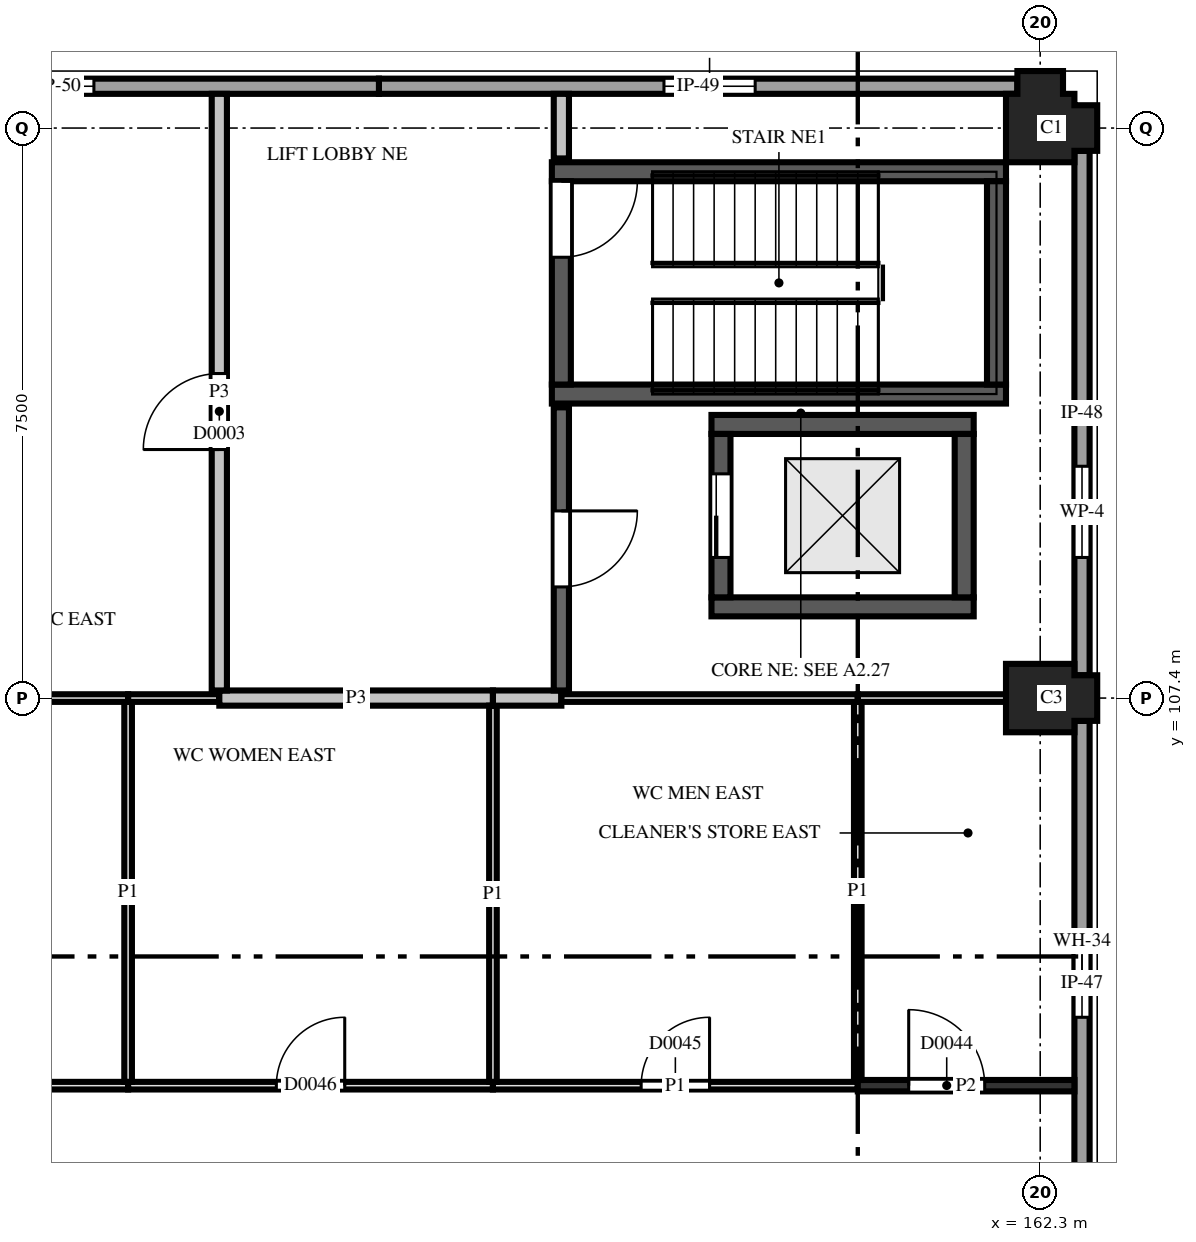
"""IFC4 building model, lengths in metres.
Left out: names, types, materials, properties, quantities, classifications, styles, units other than length and angle.
Written with IfcOpenShell. Run it as: python <this file> out.ifc"""

import sys

from ifc_helpers import new_model, si_unit, direction, frame, frame_2d, origin, place, context, subcontext, project, spatial, polyline, rectangle, outline, extrude, element, fill, save


model = new_model("IFC4")
c1 = context("Model", 3, precision=1e-05, world=origin(), true_north=direction((0.0, 1.0)))
c2 = subcontext(c1, "Body", "Model", "MODEL_VIEW")
j1 = project(units=[si_unit("LENGTHUNIT", "METRE"), si_unit("PLANEANGLEUNIT", "RADIAN")], contexts=[c1])
p1 = place(None, origin())
s1 = spatial("IfcSite", under=j1, at=p1, CompositionType="ELEMENT")
p2 = place(p1, origin())
s2 = spatial("IfcBuilding", under=s1, at=p2, CompositionType="ELEMENT")
p3 = place(p2, origin())
s3 = spatial("IfcBuildingStorey", under=s2, at=p3, CompositionType="ELEMENT", Elevation=0.0)
p4 = place(p3, frame((162.3, 107.4, 0.0), z_axis=(0.0, 0.0, 1.0), x_axis=(1.0, 0.0, 0.0)))
e1 = element("IfcColumn", 1, at=p4, inside=s3, PredefinedType="COLUMN", context=c2, shape_type="SweptSolid", body=[
    extrude(outline(polyline([(-0.45, -0.45), (0.45, -0.45), (0.45, -0.3), (0.75, -0.3), (0.75, 0.3), (0.45, 0.3), (0.45, 0.45), (-0.45, 0.45), (-0.45, -0.45)])), origin(), (0.0, 0.0, 1.0), 4.5),
])
p5 = place(p3, frame((162.3, 114.9, 0.0), z_axis=(0.0, 0.0, 1.0), x_axis=(1.0, 0.0, 0.0)))
e2 = element("IfcColumn", 2, at=p5, inside=s3, PredefinedType="COLUMN", context=c2, shape_type="SweptSolid", body=[
    extrude(outline(polyline([(-0.45, -0.45), (0.45, -0.45), (0.45, -0.3), (0.75, -0.3), (0.75, 0.3), (0.45, 0.3), (0.45, 0.45), (0.3, 0.45), (0.3, 0.75), (-0.3, 0.75), (-0.3, 0.45), (-0.45, 0.45), (-0.45, -0.45)])), origin(), (0.0, 0.0, 1.0), 4.5),
])
for number, where, z_axis, x_axis in (
    (3, (157.975, 108.6, -1.4), (0.0, 0.0, 1.0), (1.0, 0.0, 0.0)),
    (4, (157.975, 111.0, -1.4), (0.0, 0.0, 1.0), (1.0, 0.0, 0.0)),
):
    element("IfcWall", number, at=place(p3, frame(where, z_axis=z_axis, x_axis=x_axis)), inside=s3, PredefinedType="SHEAR", context=c2, shape_type="SweptSolid", body=[
        extrude(rectangle(XDim=3.45, YDim=0.25, at=frame_2d((1.725, 0.0))), origin(), (0.0, 0.0, 1.0), 5.9),
    ])
for number, where, z_axis, x_axis in (
    (5, (155.875, 111.4, 0.0), (0.0, 0.0, 1.0), (1.0, 0.0, 0.0)),
    (6, (155.875, 114.325, 0.0), (0.0, 0.0, 1.0), (1.0, 0.0, 0.0)),
):
    element("IfcWall", number, at=place(p3, frame(where, z_axis=z_axis, x_axis=x_axis)), inside=s3, PredefinedType="SHEAR", context=c2, shape_type="SweptSolid", body=[
        extrude(rectangle(XDim=5.975, YDim=0.25, at=frame_2d((2.988, 0.0))), origin(), (0.0, 0.0, 1.0), 4.5),
    ])
p6 = place(p3, frame((156.0, 111.525, 0.0), z_axis=(0.0, 0.0, 1.0), x_axis=(0.0, 1.0, 0.0)))
e7 = element("IfcWall", 7, at=p6, inside=s3, PredefinedType="SHEAR", context=c2, shape_type="SweptSolid", body=[
    extrude(rectangle(XDim=2.675, YDim=0.25, at=frame_2d((1.337, 0.0))), origin(), (0.0, 0.0, 1.0), 4.5),
])
p7 = place(p6, frame((1.675, 0.0, 0.0)))
e8 = element("IfcOpeningElement", 8, at=p7, cuts=e7, PredefinedType="OPENING", context=c2, shape_type="SweptSolid", body=[
    extrude(rectangle(XDim=1.0, YDim=2.1, at=frame_2d((0.5, 1.05))), frame((0.0, 0.135, 0.0), z_axis=(0.0, -1.0, 0.0), x_axis=(1.0, 0.0, 0.0)), (0.0, 0.0, 1.0), 0.27),
])
p8 = place(p3, frame((158.1, 108.725, -1.4), z_axis=(0.0, 0.0, 1.0), x_axis=(0.0, 1.0, 0.0)))
e9 = element("IfcWall", 9, at=p8, inside=s3, PredefinedType="SHEAR", context=c2, shape_type="SweptSolid", body=[
    extrude(rectangle(XDim=2.15, YDim=0.25, at=frame_2d((1.075, 0.0))), origin(), (0.0, 0.0, 1.0), 5.9),
])
p9 = place(p8, frame((0.525, 0.0, 1.4)))
e10 = element("IfcOpeningElement", 10, at=p9, cuts=e9, PredefinedType="OPENING", context=c2, shape_type="SweptSolid", body=[
    extrude(rectangle(XDim=1.1, YDim=2.1, at=frame_2d((0.55, 1.05))), frame((0.0, 0.135, 0.0), z_axis=(0.0, -1.0, 0.0), x_axis=(1.0, 0.0, 0.0)), (0.0, 0.0, 1.0), 0.27),
])
p10 = place(p3, frame((161.3, 108.725, -1.4), z_axis=(0.0, 0.0, 1.0), x_axis=(0.0, 1.0, 0.0)))
e11 = element("IfcWall", 11, at=p10, inside=s3, PredefinedType="SHEAR", context=c2, shape_type="SweptSolid", body=[
    extrude(rectangle(XDim=2.15, YDim=0.25, at=frame_2d((1.075, 0.0))), origin(), (0.0, 0.0, 1.0), 5.9),
])
p11 = place(p3, frame((161.725, 111.525, 0.0), z_axis=(0.0, 0.0, 1.0), x_axis=(0.0, 1.0, 0.0)))
e12 = element("IfcWall", 12, at=p11, inside=s3, PredefinedType="SHEAR", context=c2, shape_type="SweptSolid", body=[
    extrude(rectangle(XDim=2.675, YDim=0.25, at=frame_2d((1.337, 0.0))), origin(), (0.0, 0.0, 1.0), 4.5),
])
p12 = place(p3, frame((162.85, 100.2, 0.0), z_axis=(0.0, 0.0, 1.0), x_axis=(0.0, 1.0, 0.0)))
e13 = element("IfcWall", 13, at=p12, inside=s3, PredefinedType="SOLIDWALL", context=c2, shape_type="SweptSolid", body=[
    extrude(outline(polyline([(0.0, 0.0), (6.9, 0.0), (6.9, 3.1), (6.002, 3.1), (6.0, 2.4), (5.681, 2.56), (5.363, 2.695), (5.044, 2.806), (4.725, 2.895), (4.406, 2.963), (4.087, 3.012), (3.769, 3.041), (3.45, 3.05), (3.131, 3.041), (2.812, 3.012), (2.494, 2.963), (2.175, 2.895), (1.856, 2.806), (1.538, 2.695), (1.219, 2.56), (0.9, 2.4), (0.898, 3.1), (0.0, 3.1), (0.0, 0.0)])), frame((0.0, 0.1, 0.0), z_axis=(0.0, -1.0, 0.0), x_axis=(1.0, 0.0, 0.0)), (0.0, 0.0, 1.0), 0.2),
])
p13 = place(p12, frame((3.0, 0.0, 2.4)))
e14 = element("IfcOpeningElement", 14, at=p13, cuts=e13, PredefinedType="OPENING", context=c2, shape_type="SweptSolid", body=[
    extrude(rectangle(XDim=0.9, YDim=0.531, at=frame_2d((0.45, 0.266))), frame((0.0, 0.11, 0.0), z_axis=(0.0, -1.0, 0.0), x_axis=(1.0, 0.0, 0.0)), (0.0, 0.0, 1.0), 0.22),
])
p14 = place(p3, frame((162.85, 107.7, 0.0), z_axis=(0.0, 0.0, 1.0), x_axis=(0.0, 1.0, 0.0)))
e15 = element("IfcWall", 15, at=p14, inside=s3, PredefinedType="SOLIDWALL", context=c2, shape_type="SweptSolid", body=[
    extrude(outline(polyline([(0.0, 0.0), (6.9, 0.0), (6.9, 3.1), (6.002, 3.1), (6.0, 2.4), (5.681, 2.56), (5.363, 2.695), (5.044, 2.806), (4.725, 2.895), (4.406, 2.963), (4.087, 3.012), (3.769, 3.041), (3.45, 3.05), (3.131, 3.041), (2.812, 3.012), (2.494, 2.963), (2.175, 2.895), (1.856, 2.806), (1.538, 2.695), (1.219, 2.56), (0.9, 2.4), (0.898, 3.1), (0.0, 3.1), (0.0, 0.0)])), frame((0.0, 0.1, 0.0), z_axis=(0.0, -1.0, 0.0), x_axis=(1.0, 0.0, 0.0)), (0.0, 0.0, 1.0), 0.2),
])
p15 = place(p14, frame((1.55, 0.0, 0.6)))
e16 = element("IfcOpeningElement", 16, at=p15, cuts=e15, PredefinedType="OPENING", context=c2, shape_type="SweptSolid", body=[
    extrude(rectangle(XDim=1.2, YDim=1.2, at=frame_2d((0.6, 0.6))), frame((0.0, 0.11, 0.0), z_axis=(0.0, -1.0, 0.0), x_axis=(1.0, 0.0, 0.0)), (0.0, 0.0, 1.0), 0.22),
])
p16 = place(p3, frame((162.0, 115.45, 0.0), z_axis=(0.0, 0.0, 1.0), x_axis=(-1.0, 0.0, 0.0)))
e17 = element("IfcWall", 17, at=p16, inside=s3, PredefinedType="SOLIDWALL", context=c2, shape_type="SweptSolid", body=[
    extrude(outline(polyline([(0.0, 0.0), (8.4, 0.0), (8.4, 2.5), (7.202, 2.5), (7.2, 2.4), (6.806, 2.412), (6.413, 2.422), (6.019, 2.43), (5.625, 2.438), (5.231, 2.443), (4.837, 2.447), (4.444, 2.449), (4.05, 2.45), (3.656, 2.449), (3.262, 2.447), (2.869, 2.443), (2.475, 2.438), (2.081, 2.43), (1.688, 2.422), (1.294, 2.412), (0.9, 2.4), (0.898, 2.5), (0.0, 2.5), (0.0, 0.0)])), frame((0.0, 0.1, 0.0), z_axis=(0.0, -1.0, 0.0), x_axis=(1.0, 0.0, 0.0)), (0.0, 0.0, 1.0), 0.2),
])
p17 = place(p16, frame((3.45, 0.0, 0.6)))
e18 = element("IfcOpeningElement", 18, at=p17, cuts=e17, PredefinedType="OPENING", context=c2, shape_type="SweptSolid", body=[
    extrude(rectangle(XDim=1.2, YDim=1.2, at=frame_2d((0.6, 0.6))), frame((0.0, 0.11, 0.0), z_axis=(0.0, -1.0, 0.0), x_axis=(1.0, 0.0, 0.0)), (0.0, 0.0, 1.0), 0.22),
])
p18 = place(p3, frame((153.6, 115.45, 0.0), z_axis=(0.0, 0.0, 1.0), x_axis=(-1.0, 0.0, 0.0)))
e19 = element("IfcWall", 19, at=p18, inside=s3, PredefinedType="SOLIDWALL", context=c2, shape_type="SweptSolid", body=[
    extrude(outline(polyline([(0.0, 0.0), (8.4, 0.0), (8.4, 2.5), (7.502, 2.5), (7.5, 2.4), (7.106, 2.412), (6.712, 2.422), (6.319, 2.43), (5.925, 2.438), (5.531, 2.443), (5.137, 2.447), (4.744, 2.449), (4.35, 2.45), (3.956, 2.449), (3.562, 2.447), (3.169, 2.443), (2.775, 2.438), (2.381, 2.43), (1.988, 2.422), (1.594, 2.412), (1.2, 2.4), (1.198, 2.5), (0.0, 2.5), (0.0, 0.0)])), frame((0.0, 0.1, 0.0), z_axis=(0.0, -1.0, 0.0), x_axis=(1.0, 0.0, 0.0)), (0.0, 0.0, 1.0), 0.2),
])
p19 = place(p18, frame((3.75, 0.0, 0.6)))
e20 = element("IfcOpeningElement", 20, at=p19, cuts=e19, PredefinedType="OPENING", context=c2, shape_type="SweptSolid", body=[
    extrude(rectangle(XDim=1.2, YDim=1.2, at=frame_2d((0.6, 0.6))), frame((0.0, 0.11, 0.0), z_axis=(0.0, -1.0, 0.0), x_axis=(1.0, 0.0, 0.0)), (0.0, 0.0, 1.0), 0.22),
])
p20 = place(p3, frame((150.3, 102.3, 0.0), z_axis=(0.0, 0.0, 1.0), x_axis=(-1.0, 0.0, 0.0)))
e21 = element("IfcWall", 21, at=p20, inside=s3, PredefinedType="PARTITIONING", context=c2, shape_type="SweptSolid", body=[
    extrude(rectangle(XDim=3.05, YDim=0.1, at=frame_2d((1.525, 0.0))), origin(), (0.0, 0.0, 1.0), 3.68),
])
p21 = place(p20, frame((1.025, 0.0, 0.0)))
e22 = element("IfcOpeningElement", 22, at=p21, cuts=e21, PredefinedType="OPENING", context=c2, shape_type="SweptSolid", body=[
    extrude(rectangle(XDim=1.0, YDim=2.1, at=frame_2d((0.5, 1.05))), frame((0.0, 0.06, 0.0), z_axis=(0.0, -1.0, 0.0), x_axis=(1.0, 0.0, 0.0)), (0.0, 0.0, 1.0), 0.12),
])
p22 = place(p3, frame((155.1, 102.3, 0.0), z_axis=(0.0, 0.0, 1.0), x_axis=(-1.0, 0.0, 0.0)))
e23 = element("IfcWall", 23, at=p22, inside=s3, PredefinedType="PARTITIONING", context=c2, shape_type="SweptSolid", body=[
    extrude(rectangle(XDim=4.8, YDim=0.1, at=frame_2d((2.4, 0.0))), origin(), (0.0, 0.0, 1.0), 3.68),
])
p23 = place(p22, frame((1.95, 0.0, 0.0)))
e24 = element("IfcOpeningElement", 24, at=p23, cuts=e23, PredefinedType="OPENING", context=c2, shape_type="SweptSolid", body=[
    extrude(rectangle(XDim=0.9, YDim=2.1, at=frame_2d((0.45, 1.05))), frame((0.0, 0.06, 0.0), z_axis=(0.0, -1.0, 0.0), x_axis=(1.0, 0.0, 0.0)), (0.0, 0.0, 1.0), 0.12),
])
p24 = place(p3, frame((159.9, 102.3, 0.0), z_axis=(0.0, 0.0, 1.0), x_axis=(-1.0, 0.0, 0.0)))
e25 = element("IfcWall", 25, at=p24, inside=s3, PredefinedType="PARTITIONING", context=c2, shape_type="SweptSolid", body=[
    extrude(rectangle(XDim=4.8, YDim=0.1, at=frame_2d((2.4, 0.0))), origin(), (0.0, 0.0, 1.0), 3.68),
])
p25 = place(p24, frame((1.95, 0.0, 0.0)))
e26 = element("IfcOpeningElement", 26, at=p25, cuts=e25, PredefinedType="OPENING", context=c2, shape_type="SweptSolid", body=[
    extrude(rectangle(XDim=0.9, YDim=2.1, at=frame_2d((0.45, 1.05))), frame((0.0, 0.06, 0.0), z_axis=(0.0, -1.0, 0.0), x_axis=(1.0, 0.0, 0.0)), (0.0, 0.0, 1.0), 0.12),
])
p26 = place(p3, frame((162.75, 102.3, 0.0), z_axis=(0.0, 0.0, 1.0), x_axis=(-1.0, 0.0, 0.0)))
e27 = element("IfcWall", 27, at=p26, inside=s3, PredefinedType="PARTITIONING", context=c2, shape_type="SweptSolid", body=[
    extrude(rectangle(XDim=2.85, YDim=0.15, at=frame_2d((1.425, 0.0))), origin(), (0.0, 0.0, 1.0), 3.68),
])
p27 = place(p26, frame((1.18, 0.0, 0.0)))
e28 = element("IfcOpeningElement", 28, at=p27, cuts=e27, PredefinedType="OPENING", context=c2, shape_type="SweptSolid", body=[
    extrude(rectangle(XDim=1.0, YDim=2.1, at=frame_2d((0.5, 1.05))), frame((0.0, 0.085, 0.0), z_axis=(0.0, -1.0, 0.0), x_axis=(1.0, 0.0, 0.0)), (0.0, 0.0, 1.0), 0.17),
])
p28 = place(p3, frame((150.3, 107.35, 0.0), z_axis=(0.0, 0.0, 1.0), x_axis=(0.0, -1.0, 0.0)))
e29 = element("IfcWall", 29, at=p28, inside=s3, PredefinedType="PARTITIONING", context=c2, shape_type="SweptSolid", body=[
    extrude(rectangle(XDim=5.0, YDim=0.1, at=frame_2d((2.5, 0.0))), origin(), (0.0, 0.0, 1.0), 3.68),
])
p29 = place(p3, frame((150.3, 107.4, 0.0), z_axis=(0.0, 0.0, 1.0), x_axis=(-1.0, 0.0, 0.0)))
e30 = element("IfcWall", 30, at=p29, inside=s3, PredefinedType="PARTITIONING", context=c2, shape_type="SweptSolid", body=[
    extrude(rectangle(XDim=3.05, YDim=0.1, at=frame_2d((1.525, 0.0))), origin(), (0.0, 0.0, 1.0), 3.68),
])
p30 = place(p3, frame((151.5, 107.4, 0.0), z_axis=(0.0, 0.0, 1.0), x_axis=(-1.0, 0.0, 0.0)))
e31 = element("IfcWall", 31, at=p30, inside=s3, PredefinedType="PARTITIONING", context=c2, shape_type="SweptSolid", body=[
    extrude(rectangle(XDim=1.2, YDim=0.1, at=frame_2d((0.6, 0.0))), origin(), (0.0, 0.0, 1.0), 3.68),
])
p31 = place(p3, frame((151.5, 107.4, 0.0), z_axis=(0.0, 0.0, 1.0), x_axis=(1.0, 0.0, 0.0)))
e32 = element("IfcWall", 32, at=p31, inside=s3, PredefinedType="PARTITIONING", context=c2, shape_type="SweptSolid", body=[
    extrude(rectangle(XDim=3.6, YDim=0.2, at=frame_2d((1.8, 0.0))), origin(), (0.0, 0.0, 1.0), 3.68),
])
p32 = place(p3, frame((155.1, 107.3, 0.0), z_axis=(0.0, 0.0, 1.0), x_axis=(0.0, -1.0, 0.0)))
e33 = element("IfcWall", 33, at=p32, inside=s3, PredefinedType="PARTITIONING", context=c2, shape_type="SweptSolid", body=[
    extrude(rectangle(XDim=4.95, YDim=0.1, at=frame_2d((2.475, 0.0))), origin(), (0.0, 0.0, 1.0), 3.68),
])
p33 = place(p3, frame((155.1, 107.4, 0.0), z_axis=(0.0, 0.0, 1.0), x_axis=(1.0, 0.0, 0.0)))
e34 = element("IfcWall", 34, at=p33, inside=s3, PredefinedType="PARTITIONING", context=c2, shape_type="SweptSolid", body=[
    extrude(rectangle(XDim=0.9, YDim=0.2, at=frame_2d((0.45, 0.0))), origin(), (0.0, 0.0, 1.0), 3.68),
])
p34 = place(p3, frame((156.0, 107.5, 0.0), z_axis=(0.0, 0.0, 1.0), x_axis=(0.0, 1.0, 0.0)))
e35 = element("IfcWall", 35, at=p34, inside=s3, PredefinedType="PARTITIONING", context=c2, shape_type="SweptSolid", body=[
    extrude(rectangle(XDim=3.725, YDim=0.2, at=frame_2d((1.863, 0.0))), origin(), (0.0, 0.0, 1.0), 3.68),
])
p35 = place(p34, frame((1.363, 0.0, 0.0)))
e36 = element("IfcOpeningElement", 36, at=p35, cuts=e35, PredefinedType="OPENING", context=c2, shape_type="SweptSolid", body=[
    extrude(rectangle(XDim=1.0, YDim=2.1, at=frame_2d((0.5, 1.05))), frame((0.0, 0.11, 0.0), z_axis=(0.0, -1.0, 0.0), x_axis=(1.0, 0.0, 0.0)), (0.0, 0.0, 1.0), 0.22),
])
p36 = place(p3, frame((159.9, 107.35, 0.0), z_axis=(0.0, 0.0, 1.0), x_axis=(0.0, -1.0, 0.0)))
e37 = element("IfcWall", 37, at=p36, inside=s3, PredefinedType="PARTITIONING", context=c2, shape_type="SweptSolid", body=[
    extrude(rectangle(XDim=4.975, YDim=0.1, at=frame_2d((2.488, 0.0))), origin(), (0.0, 0.0, 1.0), 3.68),
])
p37 = place(p3, frame((159.9, 107.4, 0.0), z_axis=(0.0, 0.0, 1.0), x_axis=(-1.0, 0.0, 0.0)))
e38 = element("IfcWall", 38, at=p37, inside=s3, PredefinedType="PARTITIONING", context=c2, shape_type="SweptSolid", body=[
    extrude(rectangle(XDim=3.9, YDim=0.1, at=frame_2d((1.95, 0.0))), origin(), (0.0, 0.0, 1.0), 3.68),
])
p38 = place(p3, frame((162.24, 107.4, 0.0), z_axis=(0.0, 0.0, 1.0), x_axis=(-1.0, 0.0, 0.0)))
e39 = element("IfcWall", 39, at=p38, inside=s3, PredefinedType="PARTITIONING", context=c2, shape_type="SweptSolid", body=[
    extrude(rectangle(XDim=2.34, YDim=0.1, at=frame_2d((1.17, 0.0))), origin(), (0.0, 0.0, 1.0), 3.68),
])
p39 = place(p3, frame((156.0, 114.5, 0.0), z_axis=(0.0, 0.0, 1.0), x_axis=(0.0, 1.0, 0.0)))
e40 = element("IfcWall", 40, at=p39, inside=s3, PredefinedType="PARTITIONING", context=c2, shape_type="SweptSolid", body=[
    extrude(rectangle(XDim=0.85, YDim=0.2, at=frame_2d((0.425, 0.0))), origin(), (0.0, 0.0, 1.0), 3.68),
])
p40 = place(p3, frame((151.5, 115.35, 0.0), z_axis=(0.0, 0.0, 1.0), x_axis=(0.0, -1.0, 0.0)))
e41 = element("IfcWall", 41, at=p40, inside=s3, PredefinedType="PARTITIONING", context=c2, shape_type="SweptSolid", body=[
    extrude(rectangle(XDim=7.85, YDim=0.2, at=frame_2d((3.925, 0.0))), origin(), (0.0, 0.0, 1.0), 3.68),
])
p41 = place(p40, frame((3.68, 0.0, 0.0)))
e42 = element("IfcOpeningElement", 42, at=p41, cuts=e41, PredefinedType="OPENING", context=c2, shape_type="SweptSolid", body=[
    extrude(rectangle(XDim=1.0, YDim=2.1, at=frame_2d((0.5, 1.05))), frame((0.0, 0.11, 0.0), z_axis=(0.0, -1.0, 0.0), x_axis=(1.0, 0.0, 0.0)), (0.0, 0.0, 1.0), 0.22),
])
p42 = place(p13, origin())
e43 = element("IfcWindow", 43, at=p42, inside=s3, PartitioningType="SINGLE_PANEL", PredefinedType="WINDOW", context=c2, shape_type="SweptSolid", body=[
    extrude(rectangle(XDim=0.9, YDim=0.531, at=frame_2d((0.45, 0.266))), frame((0.0, 0.03, 0.0), z_axis=(0.0, -1.0, 0.0), x_axis=(1.0, 0.0, 0.0)), (0.0, 0.0, 1.0), 0.06),
])
fill(e14, e43)
p43 = place(p15, origin())
e44 = element("IfcWindow", 44, at=p43, inside=s3, PartitioningType="SINGLE_PANEL", PredefinedType="WINDOW", context=c2, shape_type="SweptSolid", body=[
    extrude(rectangle(XDim=1.2, YDim=1.2, at=frame_2d((0.6, 0.6))), frame((0.0, 0.03, 0.0), z_axis=(0.0, -1.0, 0.0), x_axis=(1.0, 0.0, 0.0)), (0.0, 0.0, 1.0), 0.06),
])
fill(e16, e44)
p44 = place(p17, origin())
e45 = element("IfcWindow", 45, at=p44, inside=s3, PartitioningType="SINGLE_PANEL", PredefinedType="WINDOW", context=c2, shape_type="SweptSolid", body=[
    extrude(rectangle(XDim=1.2, YDim=1.2, at=frame_2d((0.6, 0.6))), frame((0.0, 0.03, 0.0), z_axis=(0.0, -1.0, 0.0), x_axis=(1.0, 0.0, 0.0)), (0.0, 0.0, 1.0), 0.06),
])
fill(e18, e45)
p45 = place(p19, origin())
e46 = element("IfcWindow", 46, at=p45, inside=s3, PartitioningType="SINGLE_PANEL", PredefinedType="WINDOW", context=c2, shape_type="SweptSolid", body=[
    extrude(rectangle(XDim=1.2, YDim=1.2, at=frame_2d((0.6, 0.6))), frame((0.0, 0.03, 0.0), z_axis=(0.0, -1.0, 0.0), x_axis=(1.0, 0.0, 0.0)), (0.0, 0.0, 1.0), 0.06),
])
fill(e20, e46)
p46 = place(p41, origin())
e47 = element("IfcDoor", 47, at=p46, inside=s3, OperationType="SINGLE_SWING_RIGHT", PredefinedType="DOOR", context=c2, shape_type="SweptSolid", body=[
    extrude(rectangle(XDim=1.0, YDim=2.1, at=frame_2d((0.5, 1.05))), frame((0.0, 0.025, 0.0), z_axis=(0.0, -1.0, 0.0), x_axis=(1.0, 0.0, 0.0)), (0.0, 0.0, 1.0), 0.05),
])
fill(e42, e47)
p47 = place(p27, origin())
e48 = element("IfcDoor", 48, at=p47, inside=s3, OperationType="SINGLE_SWING_RIGHT", PredefinedType="DOOR", context=c2, shape_type="SweptSolid", body=[
    extrude(rectangle(XDim=1.0, YDim=2.1, at=frame_2d((0.5, 1.05))), frame((0.0, 0.025, 0.0), z_axis=(0.0, -1.0, 0.0), x_axis=(1.0, 0.0, 0.0)), (0.0, 0.0, 1.0), 0.05),
])
fill(e28, e48)
p48 = place(p25, origin())
e49 = element("IfcDoor", 49, at=p48, inside=s3, OperationType="SINGLE_SWING_LEFT", PredefinedType="DOOR", context=c2, shape_type="SweptSolid", body=[
    extrude(rectangle(XDim=0.9, YDim=2.1, at=frame_2d((0.45, 1.05))), frame((0.0, 0.025, 0.0), z_axis=(0.0, -1.0, 0.0), x_axis=(1.0, 0.0, 0.0)), (0.0, 0.0, 1.0), 0.05),
])
fill(e26, e49)
p49 = place(p23, origin())
e50 = element("IfcDoor", 50, at=p49, inside=s3, OperationType="SINGLE_SWING_LEFT", PredefinedType="DOOR", context=c2, shape_type="SweptSolid", body=[
    extrude(rectangle(XDim=0.9, YDim=2.1, at=frame_2d((0.45, 1.05))), frame((0.0, 0.025, 0.0), z_axis=(0.0, -1.0, 0.0), x_axis=(1.0, 0.0, 0.0)), (0.0, 0.0, 1.0), 0.05),
])
fill(e24, e50)
p50 = place(p9, origin())
e51 = element("IfcDoor", 51, at=p50, inside=s3, OperationType="SLIDING_TO_LEFT", PredefinedType="DOOR", context=c2, shape_type="SweptSolid", body=[
    extrude(rectangle(XDim=1.1, YDim=2.1, at=frame_2d((0.55, 1.05))), frame((0.0, 0.025, 0.0), z_axis=(0.0, -1.0, 0.0), x_axis=(1.0, 0.0, 0.0)), (0.0, 0.0, 1.0), 0.05),
])
fill(e10, e51)
p51 = place(p7, origin())
e52 = element("IfcDoor", 52, at=p51, inside=s3, OperationType="SINGLE_SWING_RIGHT", PredefinedType="DOOR", context=c2, shape_type="SweptSolid", body=[
    extrude(rectangle(XDim=1.0, YDim=2.1, at=frame_2d((0.5, 1.05))), frame((0.0, 0.025, 0.0), z_axis=(0.0, -1.0, 0.0), x_axis=(1.0, 0.0, 0.0)), (0.0, 0.0, 1.0), 0.05),
])
fill(e8, e52)
p52 = place(p35, origin())
e53 = element("IfcDoor", 53, at=p52, inside=s3, OperationType="SINGLE_SWING_RIGHT", PredefinedType="DOOR", context=c2, shape_type="SweptSolid", body=[
    extrude(rectangle(XDim=1.0, YDim=2.1, at=frame_2d((0.5, 1.05))), frame((0.0, 0.025, 0.0), z_axis=(0.0, -1.0, 0.0), x_axis=(1.0, 0.0, 0.0)), (0.0, 0.0, 1.0), 0.05),
])
fill(e36, e53)
save(model, sys.argv[1])
